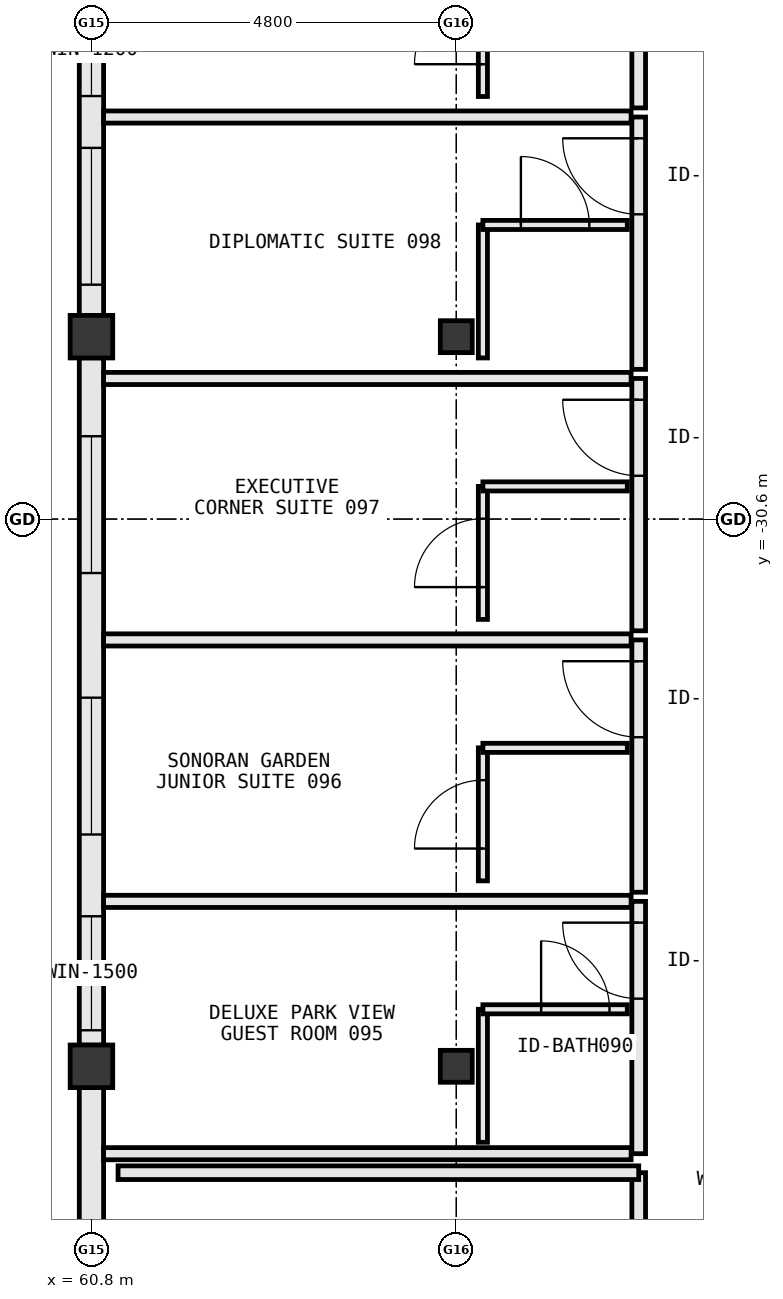
"""IFC4 building model, lengths in metres.
Left out: names, types, materials, properties, quantities, classifications, styles, units other than length and angle.
Written with IfcOpenShell. Run it as: python <this file> out.ifc"""

import sys

from ifc_helpers import new_model, si_unit, direction, frame, frame_2d, origin, origin_2d, place, context, subcontext, project, spatial, rectangle, extrude, element, fill, save


model = new_model("IFC4")
c1 = context("Model", 3, precision=1e-05, world=origin(), true_north=direction((0.0, 1.0)))
c2 = subcontext(c1, "Body", "Model", "MODEL_VIEW")
j1 = project(units=[si_unit("LENGTHUNIT", "METRE"), si_unit("PLANEANGLEUNIT", "RADIAN")], contexts=[c1])
p1 = place(None, origin())
s1 = spatial("IfcSite", under=j1, at=p1, CompositionType="ELEMENT")
p2 = place(p1, origin())
s2 = spatial("IfcBuilding", under=s1, at=p2, CompositionType="ELEMENT")
p3 = place(p2, frame((0.0, 0.0, 20.0)))
s3 = spatial("IfcBuildingStorey", under=s2, at=p3, CompositionType="ELEMENT", Elevation=20.0)
for number, where, z_axis, x_axis in (
    (1, (60.8, -37.8, 0.0), (0.0, 0.0, 1.0), (1.0, 0.0, 0.0)),
    (2, (60.8, -28.2, 0.0), (0.0, 0.0, 1.0), (1.0, 0.0, 0.0)),
):
    element("IfcColumn", number, at=place(p3, frame(where, z_axis=z_axis, x_axis=x_axis)), inside=s3, PredefinedType="COLUMN", context=c2, shape_type="SweptSolid", body=[
        extrude(rectangle(XDim=0.56, YDim=0.56, at=origin_2d()), origin(), (0.0, 0.0, 1.0), 3.8),
    ])
for number, where, z_axis, x_axis in (
    (3, (65.6, -37.8, 0.0), (0.0, 0.0, 1.0), (1.0, 0.0, 0.0)),
    (4, (65.6, -28.2, 0.0), (0.0, 0.0, 1.0), (1.0, 0.0, 0.0)),
):
    element("IfcColumn", number, at=place(p3, frame(where, z_axis=z_axis, x_axis=x_axis)), inside=s3, PredefinedType="COLUMN", context=c2, shape_type="SweptSolid", body=[
        extrude(rectangle(XDim=0.42, YDim=0.42, at=origin_2d()), origin(), (0.0, 0.0, 1.0), 3.8),
    ])
p4 = place(p3, frame((60.8, -23.678, 0.0), z_axis=(0.0, 0.0, 1.0), x_axis=(0.0, -1.0, 0.0)))
e5 = element("IfcWall", 5, at=p4, inside=s3, PredefinedType="STANDARD", context=c2, shape_type="SweptSolid", body=[
    extrude(rectangle(XDim=4.244, YDim=0.32, at=frame_2d((2.122, 0.0))), origin(), (0.0, 0.0, 1.0), 3.005),
])
p5 = place(p4, frame((2.038, 0.0, 0.85)))
e6 = element("IfcOpeningElement", 6, at=p5, cuts=e5, PredefinedType="OPENING", context=c2, shape_type="SweptSolid", body=[
    extrude(rectangle(XDim=1.8, YDim=1.85, at=frame_2d((0.9, 0.925))), frame((0.0, 0.172, 0.0), z_axis=(0.0, -1.0, 0.0), x_axis=(1.0, 0.0, 0.0)), (0.0, 0.0, 1.0), 0.344),
])
p6 = place(p4, frame((0.156, 0.0, 0.85)))
e7 = element("IfcOpeningElement", 7, at=p6, cuts=e5, PredefinedType="OPENING", context=c2, shape_type="SweptSolid", body=[
    extrude(rectangle(XDim=1.2, YDim=1.55, at=frame_2d((0.6, 0.775))), frame((0.0, 0.172, 0.0), z_axis=(0.0, -1.0, 0.0), x_axis=(1.0, 0.0, 0.0)), (0.0, 0.0, 1.0), 0.344),
])
p7 = place(p3, frame((60.8, -28.478, 0.0), z_axis=(0.0, 0.0, 1.0), x_axis=(0.0, -1.0, 0.0)))
e8 = element("IfcWall", 8, at=p7, inside=s3, PredefinedType="STANDARD", context=c2, shape_type="SweptSolid", body=[
    extrude(rectangle(XDim=9.044, YDim=0.32, at=frame_2d((4.522, 0.0))), origin(), (0.0, 0.0, 1.0), 2.905),
])
p8 = place(p7, frame((7.348, 0.0, 0.85)))
e9 = element("IfcOpeningElement", 9, at=p8, cuts=e8, PredefinedType="OPENING", context=c2, shape_type="SweptSolid", body=[
    extrude(rectangle(XDim=1.5, YDim=1.75, at=frame_2d((0.75, 0.875))), frame((0.0, 0.172, 0.0), z_axis=(0.0, -1.0, 0.0), x_axis=(1.0, 0.0, 0.0)), (0.0, 0.0, 1.0), 0.344),
])
p9 = place(p7, frame((4.472, 0.0, 0.85)))
e10 = element("IfcOpeningElement", 10, at=p9, cuts=e8, PredefinedType="OPENING", context=c2, shape_type="SweptSolid", body=[
    extrude(rectangle(XDim=1.8, YDim=1.85, at=frame_2d((0.9, 0.925))), frame((0.0, 0.172, 0.0), z_axis=(0.0, -1.0, 0.0), x_axis=(1.0, 0.0, 0.0)), (0.0, 0.0, 1.0), 0.344),
])
p10 = place(p7, frame((1.032, 0.0, 0.85)))
e11 = element("IfcOpeningElement", 11, at=p10, cuts=e8, PredefinedType="OPENING", context=c2, shape_type="SweptSolid", body=[
    extrude(rectangle(XDim=1.8, YDim=1.85, at=frame_2d((0.9, 0.925))), frame((0.0, 0.172, 0.0), z_axis=(0.0, -1.0, 0.0), x_axis=(1.0, 0.0, 0.0)), (0.0, 0.0, 1.0), 0.344),
])
p11 = place(p3, frame((60.8, -38.078, 0.0), z_axis=(0.0, 0.0, 1.0), x_axis=(0.0, -1.0, 0.0)))
e12 = element("IfcWall", 12, at=p11, inside=s3, PredefinedType="STANDARD", context=c2, shape_type="SweptSolid", body=[
    extrude(rectangle(XDim=9.044, YDim=0.32, at=frame_2d((4.522, 0.0))), origin(), (0.0, 0.0, 1.0), 2.905),
])
p12 = place(p11, frame((5.883, 0.0, 0.85)))
e13 = element("IfcOpeningElement", 13, at=p12, cuts=e12, PredefinedType="OPENING", context=c2, shape_type="SweptSolid", body=[
    extrude(rectangle(XDim=1.8, YDim=1.85, at=frame_2d((0.9, 0.925))), frame((0.0, 0.172, 0.0), z_axis=(0.0, -1.0, 0.0), x_axis=(1.0, 0.0, 0.0)), (0.0, 0.0, 1.0), 0.344),
])
p13 = place(p3, frame((68.0, -47.05, 0.0), z_axis=(0.0, 0.0, 1.0), x_axis=(0.0, 1.0, 0.0)))
e14 = element("IfcWall", 14, at=p13, inside=s3, PredefinedType="PARTITIONING", context=c2, shape_type="SweptSolid", body=[
    extrude(rectangle(XDim=7.85, YDim=0.18, at=frame_2d((3.925, 0.0))), origin(), (0.0, 0.0, 1.0), 3.55),
])
p14 = place(p13, frame((3.4, 0.0, 0.0)))
e15 = element("IfcOpeningElement", 15, at=p14, cuts=e14, PredefinedType="OPENING", context=c2, shape_type="SweptSolid", body=[
    extrude(rectangle(XDim=1.05, YDim=2.2, at=frame_2d((0.525, 1.1))), frame((0.0, 0.102, 0.0), z_axis=(0.0, -1.0, 0.0), x_axis=(1.0, 0.0, 0.0)), (0.0, 0.0, 1.0), 0.204),
])
p15 = place(p3, frame((68.0, -39.2, 0.0), z_axis=(0.0, 0.0, 1.0), x_axis=(-1.0, 0.0, 0.0)))
e16 = element("IfcWall", 16, at=p15, inside=s3, PredefinedType="PARTITIONING", context=c2, shape_type="SweptSolid", body=[
    extrude(rectangle(XDim=6.85, YDim=0.18, at=frame_2d((3.425, 0.0))), origin(), (0.0, 0.0, 1.0), 3.55),
])
p16 = place(p3, frame((68.0, -38.95, 0.0), z_axis=(0.0, 0.0, 1.0), x_axis=(0.0, 1.0, 0.0)))
e17 = element("IfcWall", 17, at=p16, inside=s3, PredefinedType="PARTITIONING", context=c2, shape_type="SweptSolid", body=[
    extrude(rectangle(XDim=3.32, YDim=0.18, at=frame_2d((1.66, 0.0))), origin(), (0.0, 0.0, 1.0), 3.55),
])
p17 = place(p16, frame((2.04, 0.0, 0.0)))
e18 = element("IfcOpeningElement", 18, at=p17, cuts=e17, PredefinedType="OPENING", context=c2, shape_type="SweptSolid", body=[
    extrude(rectangle(XDim=1.0, YDim=2.2, at=frame_2d((0.5, 1.1))), frame((0.0, 0.102, 0.0), z_axis=(0.0, -1.0, 0.0), x_axis=(1.0, 0.0, 0.0)), (0.0, 0.0, 1.0), 0.204),
])
for number, where, z_axis, x_axis in (
    (19, (60.96, -38.95, 0.0), (0.0, 0.0, 1.0), (1.0, 0.0, 0.0)),
    (20, (60.96, -35.63, 0.0), (0.0, 0.0, 1.0), (1.0, 0.0, 0.0)),
):
    element("IfcWall", number, at=place(p3, frame(where, z_axis=z_axis, x_axis=x_axis)), inside=s3, PredefinedType="PARTITIONING", context=c2, shape_type="SweptSolid", body=[
        extrude(rectangle(XDim=6.94, YDim=0.16, at=frame_2d((3.47, 0.0))), origin(), (0.0, 0.0, 1.0), 3.55),
    ])
p18 = place(p3, frame((65.95, -38.8, 0.0), z_axis=(0.0, 0.0, 1.0), x_axis=(0.0, 1.0, 0.0)))
e21 = element("IfcWall", 21, at=p18, inside=s3, PredefinedType="PARTITIONING", context=c2, shape_type="SweptSolid", body=[
    extrude(rectangle(XDim=1.75, YDim=0.12, at=frame_2d((0.875, 0.0))), origin(), (0.0, 0.0, 1.0), 2.905),
])
p19 = place(p3, frame((65.95, -37.05, 0.0), z_axis=(0.0, 0.0, 1.0), x_axis=(1.0, 0.0, 0.0)))
e22 = element("IfcWall", 22, at=p19, inside=s3, PredefinedType="PARTITIONING", context=c2, shape_type="SweptSolid", body=[
    extrude(rectangle(XDim=1.9, YDim=0.12, at=frame_2d((0.95, 0.0))), origin(), (0.0, 0.0, 1.0), 3.55),
])
p20 = place(p19, frame((0.766, 0.0, 0.0)))
e23 = element("IfcOpeningElement", 23, at=p20, cuts=e22, PredefinedType="OPENING", context=c2, shape_type="SweptSolid", body=[
    extrude(rectangle(XDim=0.9, YDim=2.15, at=frame_2d((0.45, 1.075))), frame((0.0, 0.072, 0.0), z_axis=(0.0, -1.0, 0.0), x_axis=(1.0, 0.0, 0.0)), (0.0, 0.0, 1.0), 0.144),
])
p21 = place(p3, frame((68.0, -35.51, 0.0), z_axis=(0.0, 0.0, 1.0), x_axis=(0.0, 1.0, 0.0)))
e24 = element("IfcWall", 24, at=p21, inside=s3, PredefinedType="PARTITIONING", context=c2, shape_type="SweptSolid", body=[
    extrude(rectangle(XDim=3.32, YDim=0.18, at=frame_2d((1.66, 0.0))), origin(), (0.0, 0.0, 1.0), 3.55),
])
p22 = place(p21, frame((2.04, 0.0, 0.0)))
e25 = element("IfcOpeningElement", 25, at=p22, cuts=e24, PredefinedType="OPENING", context=c2, shape_type="SweptSolid", body=[
    extrude(rectangle(XDim=1.0, YDim=2.2, at=frame_2d((0.5, 1.1))), frame((0.0, 0.102, 0.0), z_axis=(0.0, -1.0, 0.0), x_axis=(1.0, 0.0, 0.0)), (0.0, 0.0, 1.0), 0.204),
])
p23 = place(p3, frame((60.96, -32.19, 0.0), z_axis=(0.0, 0.0, 1.0), x_axis=(1.0, 0.0, 0.0)))
e26 = element("IfcWall", 26, at=p23, inside=s3, PredefinedType="PARTITIONING", context=c2, shape_type="SweptSolid", body=[
    extrude(rectangle(XDim=6.94, YDim=0.16, at=frame_2d((3.47, 0.0))), origin(), (0.0, 0.0, 1.0), 3.55),
])
p24 = place(p3, frame((65.95, -35.36, 0.0), z_axis=(0.0, 0.0, 1.0), x_axis=(0.0, 1.0, 0.0)))
e27 = element("IfcWall", 27, at=p24, inside=s3, PredefinedType="PARTITIONING", context=c2, shape_type="SweptSolid", body=[
    extrude(rectangle(XDim=1.75, YDim=0.12, at=frame_2d((0.875, 0.0))), origin(), (0.0, 0.0, 1.0), 2.905),
])
p25 = place(p24, frame((0.425, 0.0, 0.0)))
e28 = element("IfcOpeningElement", 28, at=p25, cuts=e27, PredefinedType="OPENING", context=c2, shape_type="SweptSolid", body=[
    extrude(rectangle(XDim=0.9, YDim=2.15, at=frame_2d((0.45, 1.075))), frame((0.0, 0.072, 0.0), z_axis=(0.0, -1.0, 0.0), x_axis=(1.0, 0.0, 0.0)), (0.0, 0.0, 1.0), 0.144),
])
p26 = place(p3, frame((65.95, -33.61, 0.0), z_axis=(0.0, 0.0, 1.0), x_axis=(1.0, 0.0, 0.0)))
e29 = element("IfcWall", 29, at=p26, inside=s3, PredefinedType="PARTITIONING", context=c2, shape_type="SweptSolid", body=[
    extrude(rectangle(XDim=1.9, YDim=0.12, at=frame_2d((0.95, 0.0))), origin(), (0.0, 0.0, 1.0), 3.55),
])
p27 = place(p3, frame((68.0, -32.07, 0.0), z_axis=(0.0, 0.0, 1.0), x_axis=(0.0, 1.0, 0.0)))
e30 = element("IfcWall", 30, at=p27, inside=s3, PredefinedType="PARTITIONING", context=c2, shape_type="SweptSolid", body=[
    extrude(rectangle(XDim=3.32, YDim=0.18, at=frame_2d((1.66, 0.0))), origin(), (0.0, 0.0, 1.0), 3.55),
])
p28 = place(p27, frame((2.04, 0.0, 0.0)))
e31 = element("IfcOpeningElement", 31, at=p28, cuts=e30, PredefinedType="OPENING", context=c2, shape_type="SweptSolid", body=[
    extrude(rectangle(XDim=1.0, YDim=2.2, at=frame_2d((0.5, 1.1))), frame((0.0, 0.102, 0.0), z_axis=(0.0, -1.0, 0.0), x_axis=(1.0, 0.0, 0.0)), (0.0, 0.0, 1.0), 0.204),
])
p29 = place(p3, frame((60.96, -28.75, 0.0), z_axis=(0.0, 0.0, 1.0), x_axis=(1.0, 0.0, 0.0)))
e32 = element("IfcWall", 32, at=p29, inside=s3, PredefinedType="PARTITIONING", context=c2, shape_type="SweptSolid", body=[
    extrude(rectangle(XDim=6.94, YDim=0.16, at=frame_2d((3.47, 0.0))), origin(), (0.0, 0.0, 1.0), 3.55),
])
p30 = place(p3, frame((65.95, -31.92, 0.0), z_axis=(0.0, 0.0, 1.0), x_axis=(0.0, 1.0, 0.0)))
e33 = element("IfcWall", 33, at=p30, inside=s3, PredefinedType="PARTITIONING", context=c2, shape_type="SweptSolid", body=[
    extrude(rectangle(XDim=1.75, YDim=0.12, at=frame_2d((0.875, 0.0))), origin(), (0.0, 0.0, 1.0), 2.905),
])
p31 = place(p30, frame((0.425, 0.0, 0.0)))
e34 = element("IfcOpeningElement", 34, at=p31, cuts=e33, PredefinedType="OPENING", context=c2, shape_type="SweptSolid", body=[
    extrude(rectangle(XDim=0.9, YDim=2.15, at=frame_2d((0.45, 1.075))), frame((0.0, 0.072, 0.0), z_axis=(0.0, -1.0, 0.0), x_axis=(1.0, 0.0, 0.0)), (0.0, 0.0, 1.0), 0.144),
])
p32 = place(p3, frame((65.95, -30.17, 0.0), z_axis=(0.0, 0.0, 1.0), x_axis=(1.0, 0.0, 0.0)))
e35 = element("IfcWall", 35, at=p32, inside=s3, PredefinedType="PARTITIONING", context=c2, shape_type="SweptSolid", body=[
    extrude(rectangle(XDim=1.9, YDim=0.12, at=frame_2d((0.95, 0.0))), origin(), (0.0, 0.0, 1.0), 3.55),
])
p33 = place(p3, frame((68.0, -28.63, 0.0), z_axis=(0.0, 0.0, 1.0), x_axis=(0.0, 1.0, 0.0)))
e36 = element("IfcWall", 36, at=p33, inside=s3, PredefinedType="PARTITIONING", context=c2, shape_type="SweptSolid", body=[
    extrude(rectangle(XDim=3.32, YDim=0.18, at=frame_2d((1.66, 0.0))), origin(), (0.0, 0.0, 1.0), 3.55),
])
p34 = place(p33, frame((2.04, 0.0, 0.0)))
e37 = element("IfcOpeningElement", 37, at=p34, cuts=e36, PredefinedType="OPENING", context=c2, shape_type="SweptSolid", body=[
    extrude(rectangle(XDim=1.0, YDim=2.2, at=frame_2d((0.5, 1.1))), frame((0.0, 0.102, 0.0), z_axis=(0.0, -1.0, 0.0), x_axis=(1.0, 0.0, 0.0)), (0.0, 0.0, 1.0), 0.204),
])
p35 = place(p3, frame((60.96, -25.31, 0.0), z_axis=(0.0, 0.0, 1.0), x_axis=(1.0, 0.0, 0.0)))
e38 = element("IfcWall", 38, at=p35, inside=s3, PredefinedType="PARTITIONING", context=c2, shape_type="SweptSolid", body=[
    extrude(rectangle(XDim=6.94, YDim=0.16, at=frame_2d((3.47, 0.0))), origin(), (0.0, 0.0, 1.0), 3.55),
])
p36 = place(p3, frame((65.95, -28.48, 0.0), z_axis=(0.0, 0.0, 1.0), x_axis=(0.0, 1.0, 0.0)))
e39 = element("IfcWall", 39, at=p36, inside=s3, PredefinedType="PARTITIONING", context=c2, shape_type="SweptSolid", body=[
    extrude(rectangle(XDim=1.75, YDim=0.12, at=frame_2d((0.875, 0.0))), origin(), (0.0, 0.0, 1.0), 2.905),
])
p37 = place(p3, frame((65.95, -26.73, 0.0), z_axis=(0.0, 0.0, 1.0), x_axis=(1.0, 0.0, 0.0)))
e40 = element("IfcWall", 40, at=p37, inside=s3, PredefinedType="PARTITIONING", context=c2, shape_type="SweptSolid", body=[
    extrude(rectangle(XDim=1.9, YDim=0.12, at=frame_2d((0.95, 0.0))), origin(), (0.0, 0.0, 1.0), 3.55),
])
p38 = place(p37, frame((0.5, 0.0, 0.0)))
e41 = element("IfcOpeningElement", 41, at=p38, cuts=e40, PredefinedType="OPENING", context=c2, shape_type="SweptSolid", body=[
    extrude(rectangle(XDim=0.9, YDim=2.15, at=frame_2d((0.45, 1.075))), frame((0.0, 0.072, 0.0), z_axis=(0.0, -1.0, 0.0), x_axis=(1.0, 0.0, 0.0)), (0.0, 0.0, 1.0), 0.144),
])
p39 = place(p3, frame((68.0, -25.19, 0.0), z_axis=(0.0, 0.0, 1.0), x_axis=(0.0, 1.0, 0.0)))
e42 = element("IfcWall", 42, at=p39, inside=s3, PredefinedType="PARTITIONING", context=c2, shape_type="SweptSolid", body=[
    extrude(rectangle(XDim=3.32, YDim=0.18, at=frame_2d((1.66, 0.0))), origin(), (0.0, 0.0, 1.0), 3.55),
])
p40 = place(p39, frame((2.04, 0.0, 0.0)))
e43 = element("IfcOpeningElement", 43, at=p40, cuts=e42, PredefinedType="OPENING", context=c2, shape_type="SweptSolid", body=[
    extrude(rectangle(XDim=1.0, YDim=2.2, at=frame_2d((0.5, 1.1))), frame((0.0, 0.102, 0.0), z_axis=(0.0, -1.0, 0.0), x_axis=(1.0, 0.0, 0.0)), (0.0, 0.0, 1.0), 0.204),
])
p41 = place(p3, frame((65.95, -25.04, 0.0), z_axis=(0.0, 0.0, 1.0), x_axis=(0.0, 1.0, 0.0)))
e44 = element("IfcWall", 44, at=p41, inside=s3, PredefinedType="PARTITIONING", context=c2, shape_type="SweptSolid", body=[
    extrude(rectangle(XDim=1.75, YDim=0.12, at=frame_2d((0.875, 0.0))), origin(), (0.0, 0.0, 1.0), 2.905),
])
p42 = place(p41, frame((0.425, 0.0, 0.0)))
e45 = element("IfcOpeningElement", 45, at=p42, cuts=e44, PredefinedType="OPENING", context=c2, shape_type="SweptSolid", body=[
    extrude(rectangle(XDim=0.9, YDim=2.15, at=frame_2d((0.45, 1.075))), frame((0.0, 0.072, 0.0), z_axis=(0.0, -1.0, 0.0), x_axis=(1.0, 0.0, 0.0)), (0.0, 0.0, 1.0), 0.144),
])
p43 = place(p8, origin())
e46 = element("IfcWindow", 46, at=p43, inside=s3, PartitioningType="SINGLE_PANEL", PredefinedType="WINDOW", context=c2, shape_type="SweptSolid", body=[
    extrude(rectangle(XDim=1.5, YDim=1.75, at=frame_2d((0.75, 0.875))), frame((0.0, 0.03, 0.0), z_axis=(0.0, -1.0, 0.0), x_axis=(1.0, 0.0, 0.0)), (0.0, 0.0, 1.0), 0.06),
])
fill(e9, e46)
p44 = place(p9, origin())
e47 = element("IfcWindow", 47, at=p44, inside=s3, PartitioningType="SINGLE_PANEL", PredefinedType="WINDOW", context=c2, shape_type="SweptSolid", body=[
    extrude(rectangle(XDim=1.8, YDim=1.85, at=frame_2d((0.9, 0.925))), frame((0.0, 0.03, 0.0), z_axis=(0.0, -1.0, 0.0), x_axis=(1.0, 0.0, 0.0)), (0.0, 0.0, 1.0), 0.06),
])
fill(e10, e47)
p45 = place(p10, origin())
e48 = element("IfcWindow", 48, at=p45, inside=s3, PartitioningType="SINGLE_PANEL", PredefinedType="WINDOW", context=c2, shape_type="SweptSolid", body=[
    extrude(rectangle(XDim=1.8, YDim=1.85, at=frame_2d((0.9, 0.925))), frame((0.0, 0.03, 0.0), z_axis=(0.0, -1.0, 0.0), x_axis=(1.0, 0.0, 0.0)), (0.0, 0.0, 1.0), 0.06),
])
fill(e11, e48)
p46 = place(p5, origin())
e49 = element("IfcWindow", 49, at=p46, inside=s3, PartitioningType="SINGLE_PANEL", PredefinedType="WINDOW", context=c2, shape_type="SweptSolid", body=[
    extrude(rectangle(XDim=1.8, YDim=1.85, at=frame_2d((0.9, 0.925))), frame((0.0, 0.03, 0.0), z_axis=(0.0, -1.0, 0.0), x_axis=(1.0, 0.0, 0.0)), (0.0, 0.0, 1.0), 0.06),
])
fill(e6, e49)
p47 = place(p6, origin())
e50 = element("IfcWindow", 50, at=p47, inside=s3, PartitioningType="SINGLE_PANEL", PredefinedType="WINDOW", context=c2, shape_type="SweptSolid", body=[
    extrude(rectangle(XDim=1.2, YDim=1.55, at=frame_2d((0.6, 0.775))), frame((0.0, 0.03, 0.0), z_axis=(0.0, -1.0, 0.0), x_axis=(1.0, 0.0, 0.0)), (0.0, 0.0, 1.0), 0.06),
])
fill(e7, e50)
p48 = place(p17, origin())
e51 = element("IfcDoor", 51, at=p48, inside=s3, OperationType="SINGLE_SWING_RIGHT", PredefinedType="DOOR", context=c2, shape_type="SweptSolid", body=[
    extrude(rectangle(XDim=1.0, YDim=2.2, at=frame_2d((0.5, 1.1))), frame((0.0, 0.025, 0.0), z_axis=(0.0, -1.0, 0.0), x_axis=(1.0, 0.0, 0.0)), (0.0, 0.0, 1.0), 0.05),
])
fill(e18, e51)
p49 = place(p20, origin())
e52 = element("IfcDoor", 52, at=p49, inside=s3, OperationType="SINGLE_SWING_LEFT", PredefinedType="DOOR", context=c2, shape_type="SweptSolid", body=[
    extrude(rectangle(XDim=0.9, YDim=2.15, at=frame_2d((0.45, 1.075))), frame((0.0, 0.025, 0.0), z_axis=(0.0, -1.0, 0.0), x_axis=(1.0, 0.0, 0.0)), (0.0, 0.0, 1.0), 0.05),
])
fill(e23, e52)
p50 = place(p22, origin())
e53 = element("IfcDoor", 53, at=p50, inside=s3, OperationType="SINGLE_SWING_RIGHT", PredefinedType="DOOR", context=c2, shape_type="SweptSolid", body=[
    extrude(rectangle(XDim=1.0, YDim=2.2, at=frame_2d((0.5, 1.1))), frame((0.0, 0.025, 0.0), z_axis=(0.0, -1.0, 0.0), x_axis=(1.0, 0.0, 0.0)), (0.0, 0.0, 1.0), 0.05),
])
fill(e25, e53)
p51 = place(p25, origin())
e54 = element("IfcDoor", 54, at=p51, inside=s3, OperationType="SINGLE_SWING_LEFT", PredefinedType="DOOR", context=c2, shape_type="SweptSolid", body=[
    extrude(rectangle(XDim=0.9, YDim=2.15, at=frame_2d((0.45, 1.075))), frame((0.0, 0.025, 0.0), z_axis=(0.0, -1.0, 0.0), x_axis=(1.0, 0.0, 0.0)), (0.0, 0.0, 1.0), 0.05),
])
fill(e28, e54)
p52 = place(p28, origin())
e55 = element("IfcDoor", 55, at=p52, inside=s3, OperationType="SINGLE_SWING_RIGHT", PredefinedType="DOOR", context=c2, shape_type="SweptSolid", body=[
    extrude(rectangle(XDim=1.0, YDim=2.2, at=frame_2d((0.5, 1.1))), frame((0.0, 0.025, 0.0), z_axis=(0.0, -1.0, 0.0), x_axis=(1.0, 0.0, 0.0)), (0.0, 0.0, 1.0), 0.05),
])
fill(e31, e55)
p53 = place(p31, origin())
e56 = element("IfcDoor", 56, at=p53, inside=s3, OperationType="SINGLE_SWING_LEFT", PredefinedType="DOOR", context=c2, shape_type="SweptSolid", body=[
    extrude(rectangle(XDim=0.9, YDim=2.15, at=frame_2d((0.45, 1.075))), frame((0.0, 0.025, 0.0), z_axis=(0.0, -1.0, 0.0), x_axis=(1.0, 0.0, 0.0)), (0.0, 0.0, 1.0), 0.05),
])
fill(e34, e56)
p54 = place(p34, origin())
e57 = element("IfcDoor", 57, at=p54, inside=s3, OperationType="SINGLE_SWING_RIGHT", PredefinedType="DOOR", context=c2, shape_type="SweptSolid", body=[
    extrude(rectangle(XDim=1.0, YDim=2.2, at=frame_2d((0.5, 1.1))), frame((0.0, 0.025, 0.0), z_axis=(0.0, -1.0, 0.0), x_axis=(1.0, 0.0, 0.0)), (0.0, 0.0, 1.0), 0.05),
])
fill(e37, e57)
p55 = place(p38, origin())
e58 = element("IfcDoor", 58, at=p55, inside=s3, OperationType="SINGLE_SWING_LEFT", PredefinedType="DOOR", context=c2, shape_type="SweptSolid", body=[
    extrude(rectangle(XDim=0.9, YDim=2.15, at=frame_2d((0.45, 1.075))), frame((0.0, 0.025, 0.0), z_axis=(0.0, -1.0, 0.0), x_axis=(1.0, 0.0, 0.0)), (0.0, 0.0, 1.0), 0.05),
])
fill(e41, e58)
p56 = place(p42, origin())
e59 = element("IfcDoor", 59, at=p56, inside=s3, OperationType="SINGLE_SWING_LEFT", PredefinedType="DOOR", context=c2, shape_type="SweptSolid", body=[
    extrude(rectangle(XDim=0.9, YDim=2.15, at=frame_2d((0.45, 1.075))), frame((0.0, 0.025, 0.0), z_axis=(0.0, -1.0, 0.0), x_axis=(1.0, 0.0, 0.0)), (0.0, 0.0, 1.0), 0.05),
])
fill(e45, e59)
save(model, sys.argv[1])
